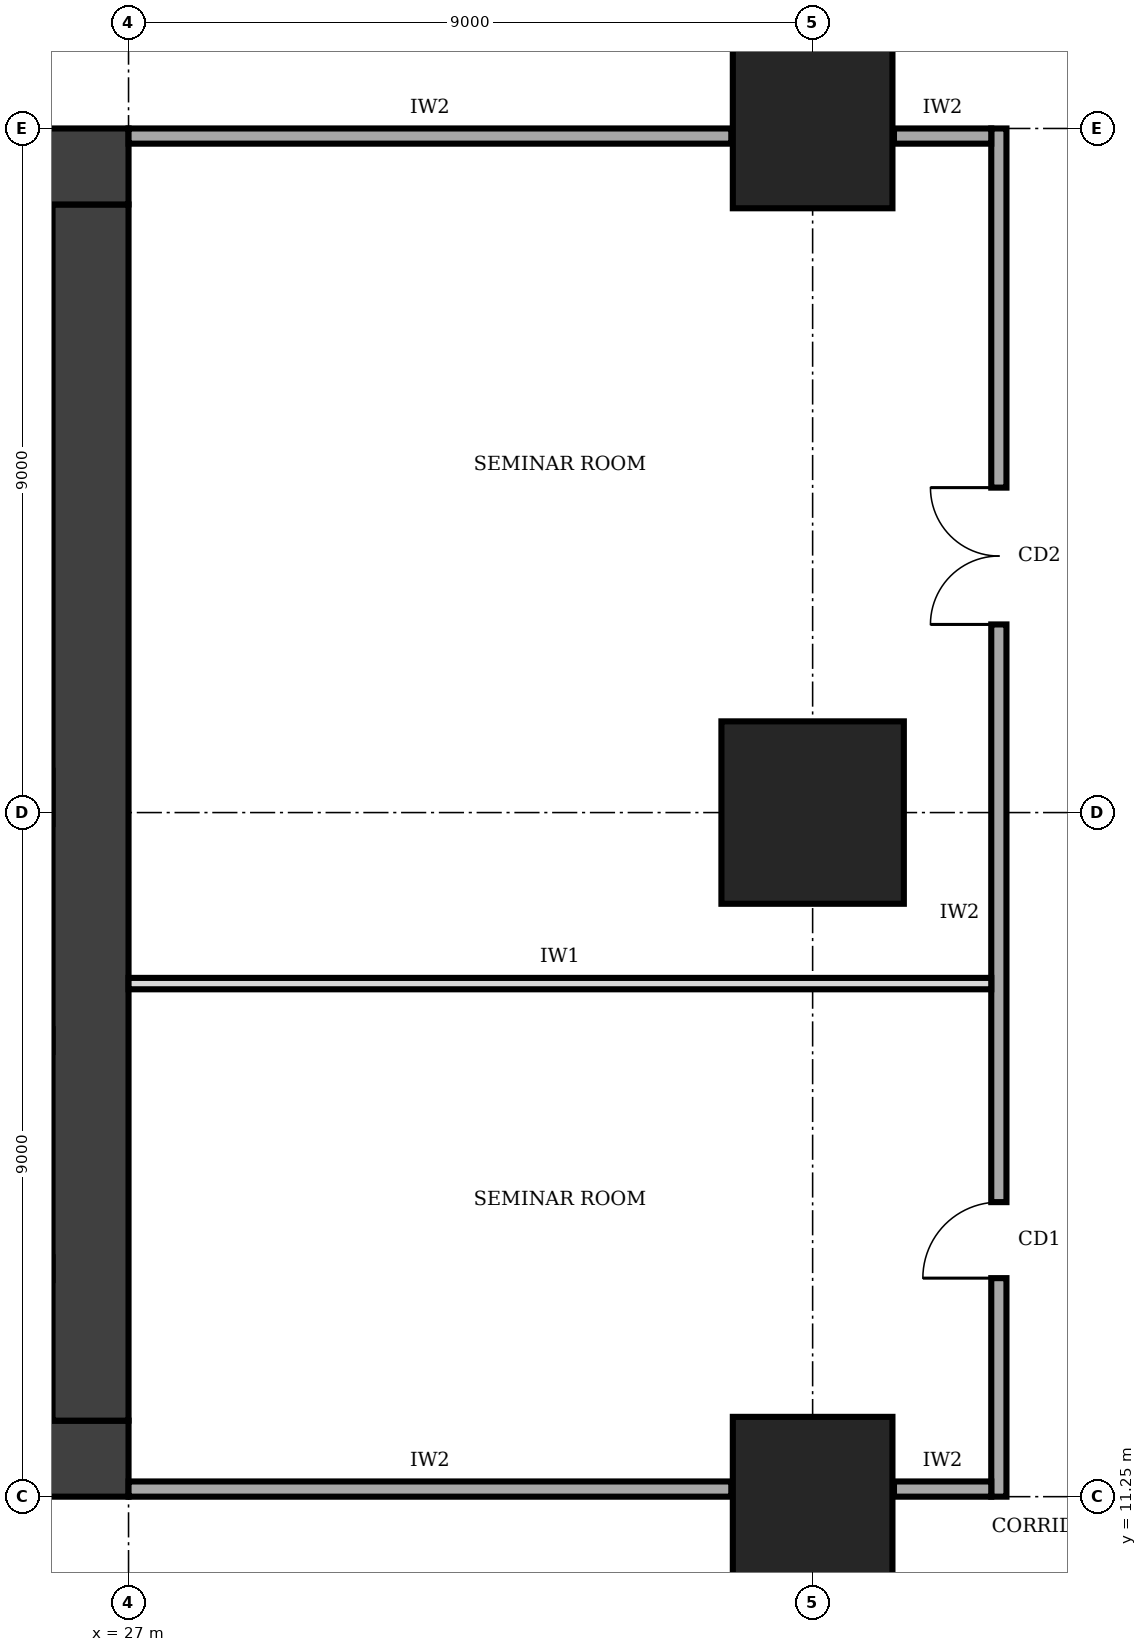
"""IFC4 building model, lengths in metres.
Left out: names, types, materials, properties, quantities, classifications, styles, units other than length and angle.
Written with IfcOpenShell. Run it as: python <this file> out.ifc"""

import sys

from ifc_helpers import new_model, si_unit, direction, frame, frame_2d, origin, origin_2d, place, context, subcontext, project, spatial, rectangle, extrude, element, fill, save


model = new_model("IFC4")
c1 = context("Model", 3, precision=1e-05, world=origin(), true_north=direction((0.0, 1.0)))
c2 = subcontext(c1, "Body", "Model", "MODEL_VIEW")
j1 = project(units=[si_unit("LENGTHUNIT", "METRE"), si_unit("PLANEANGLEUNIT", "RADIAN")], contexts=[c1])
p1 = place(None, origin())
s1 = spatial("IfcSite", under=j1, at=p1, CompositionType="ELEMENT")
p2 = place(p1, origin())
s2 = spatial("IfcBuilding", under=s1, at=p2, CompositionType="ELEMENT")
p3 = place(p2, frame((0.0, 0.0, 161.0)))
s3 = spatial("IfcBuildingStorey", under=s2, at=p3, CompositionType="ELEMENT", Elevation=161.0)
p4 = place(p3, frame((13.5, 11.75, 0.0), z_axis=(0.0, 0.0, 1.0), x_axis=(1.0, 0.0, 0.0)))
e1 = element("IfcWall", 1, at=p4, inside=s3, PredefinedType="SHEAR", context=c2, shape_type="SweptSolid", body=[
    extrude(rectangle(XDim=13.5, YDim=1.0, at=frame_2d((6.75, 0.0))), origin(), (0.0, 0.0, 1.0), 4.0),
])
p5 = place(p4, frame((4.75, 0.0, 0.0)))
e2 = element("IfcOpeningElement", 2, at=p5, cuts=e1, PredefinedType="OPENING", context=c2, shape_type="SweptSolid", body=[
    extrude(rectangle(XDim=1.0, YDim=2.1, at=frame_2d((0.5, 1.05))), frame((0.0, 0.51, 0.0), z_axis=(0.0, -1.0, 0.0), x_axis=(1.0, 0.0, 0.0)), (0.0, 0.0, 1.0), 1.02),
])
p6 = place(p3, frame((26.5, 12.25, 0.0), z_axis=(0.0, 0.0, 1.0), x_axis=(0.0, 1.0, 0.0)))
e3 = element("IfcWall", 3, at=p6, inside=s3, PredefinedType="SHEAR", context=c2, shape_type="SweptSolid", body=[
    extrude(rectangle(XDim=16.0, YDim=1.0, at=frame_2d((8.0, 0.0))), origin(), (0.0, 0.0, 1.0), 4.0),
])
p7 = place(p3, frame((27.0, 28.75, 0.0), z_axis=(0.0, 0.0, 1.0), x_axis=(-1.0, 0.0, 0.0)))
e4 = element("IfcWall", 4, at=p7, inside=s3, PredefinedType="SHEAR", context=c2, shape_type="SweptSolid", body=[
    extrude(rectangle(XDim=13.5, YDim=1.0, at=frame_2d((6.75, 0.0))), origin(), (0.0, 0.0, 1.0), 4.0),
])
p8 = place(p7, frame((4.75, 0.0, 0.0)))
e5 = element("IfcOpeningElement", 5, at=p8, cuts=e4, PredefinedType="OPENING", context=c2, shape_type="SweptSolid", body=[
    extrude(rectangle(XDim=1.8, YDim=2.1, at=frame_2d((0.9, 1.05))), frame((0.0, 0.51, 0.0), z_axis=(0.0, -1.0, 0.0), x_axis=(1.0, 0.0, 0.0)), (0.0, 0.0, 1.0), 1.02),
])
p9 = place(p3, frame((36.0, 11.25, 0.0), z_axis=(0.0, 0.0, 1.0), x_axis=(1.0, 0.0, 0.0)))
e6 = element("IfcColumn", 6, at=p9, inside=s3, PredefinedType="COLUMN", context=c2, shape_type="SweptSolid", body=[
    extrude(rectangle(XDim=2.1, YDim=2.1, at=origin_2d()), origin(), (0.0, 0.0, 1.0), 4.0),
])
p10 = place(p3, frame((36.0, 20.25, 0.0), z_axis=(0.0, 0.0, 1.0), x_axis=(1.0, 0.0, 0.0)))
e7 = element("IfcColumn", 7, at=p10, inside=s3, PredefinedType="COLUMN", context=c2, shape_type="SweptSolid", body=[
    extrude(rectangle(XDim=2.4, YDim=2.4, at=origin_2d()), origin(), (0.0, 0.0, 1.0), 4.0),
])
p11 = place(p3, frame((36.0, 29.25, 0.0), z_axis=(0.0, 0.0, 1.0), x_axis=(1.0, 0.0, 0.0)))
e8 = element("IfcColumn", 8, at=p11, inside=s3, PredefinedType="COLUMN", context=c2, shape_type="SweptSolid", body=[
    extrude(rectangle(XDim=2.1, YDim=2.1, at=origin_2d()), origin(), (0.0, 0.0, 1.0), 4.0),
])
p12 = place(p3, frame((38.45, 11.25, 0.0), z_axis=(0.0, 0.0, 1.0), x_axis=(0.0, 1.0, 0.0)))
e9 = element("IfcWall", 9, at=p12, inside=s3, PredefinedType="SOLIDWALL", context=c2, shape_type="SweptSolid", body=[
    extrude(rectangle(XDim=18.0, YDim=0.2, at=frame_2d((9.0, 0.0))), origin(), (0.0, 0.0, 1.0), 3.75),
])
p13 = place(p12, frame((2.875, 0.0, 0.0)))
e10 = element("IfcOpeningElement", 10, at=p13, cuts=e9, PredefinedType="OPENING", context=c2, shape_type="SweptSolid", body=[
    extrude(rectangle(XDim=1.0, YDim=2.1, at=frame_2d((0.5, 1.05))), frame((0.0, 0.11, 0.0), z_axis=(0.0, -1.0, 0.0), x_axis=(1.0, 0.0, 0.0)), (0.0, 0.0, 1.0), 0.22),
])
p14 = place(p12, frame((11.475, 0.0, 0.0)))
e11 = element("IfcOpeningElement", 11, at=p14, cuts=e9, PredefinedType="OPENING", context=c2, shape_type="SweptSolid", body=[
    extrude(rectangle(XDim=1.8, YDim=2.1, at=frame_2d((0.9, 1.05))), frame((0.0, 0.11, 0.0), z_axis=(0.0, -1.0, 0.0), x_axis=(1.0, 0.0, 0.0)), (0.0, 0.0, 1.0), 0.22),
])
p15 = place(p3, frame((27.0, 11.35, 0.0), z_axis=(0.0, 0.0, 1.0), x_axis=(1.0, 0.0, 0.0)))
e12 = element("IfcWall", 12, at=p15, inside=s3, PredefinedType="SOLIDWALL", context=c2, shape_type="SweptSolid", body=[
    extrude(rectangle(XDim=7.93, YDim=0.2, at=frame_2d((3.965, 0.0))), origin(), (0.0, 0.0, 1.0), 2.85),
])
p16 = place(p3, frame((37.07, 11.35, 0.0), z_axis=(0.0, 0.0, 1.0), x_axis=(1.0, 0.0, 0.0)))
e13 = element("IfcWall", 13, at=p16, inside=s3, PredefinedType="SOLIDWALL", context=c2, shape_type="SweptSolid", body=[
    extrude(rectangle(XDim=1.28, YDim=0.2, at=frame_2d((0.64, 0.0))), origin(), (0.0, 0.0, 1.0), 2.85),
])
p17 = place(p3, frame((27.0, 29.15, 0.0), z_axis=(0.0, 0.0, 1.0), x_axis=(1.0, 0.0, 0.0)))
e14 = element("IfcWall", 14, at=p17, inside=s3, PredefinedType="SOLIDWALL", context=c2, shape_type="SweptSolid", body=[
    extrude(rectangle(XDim=7.93, YDim=0.2, at=frame_2d((3.965, 0.0))), origin(), (0.0, 0.0, 1.0), 2.85),
])
p18 = place(p3, frame((37.07, 29.15, 0.0), z_axis=(0.0, 0.0, 1.0), x_axis=(1.0, 0.0, 0.0)))
e15 = element("IfcWall", 15, at=p18, inside=s3, PredefinedType="SOLIDWALL", context=c2, shape_type="SweptSolid", body=[
    extrude(rectangle(XDim=1.28, YDim=0.2, at=frame_2d((0.64, 0.0))), origin(), (0.0, 0.0, 1.0), 2.85),
])
p19 = place(p3, frame((27.0, 18.0, 0.0), z_axis=(0.0, 0.0, 1.0), x_axis=(1.0, 0.0, 0.0)))
e16 = element("IfcWall", 16, at=p19, inside=s3, PredefinedType="PARTITIONING", context=c2, shape_type="SweptSolid", body=[
    extrude(rectangle(XDim=11.35, YDim=0.15, at=frame_2d((5.675, 0.0))), origin(), (0.0, 0.0, 1.0), 3.75),
])
p20 = place(p13, origin())
e17 = element("IfcDoor", 17, at=p20, inside=s3, OperationType="SINGLE_SWING_LEFT", PredefinedType="DOOR", context=c2, shape_type="SweptSolid", body=[
    extrude(rectangle(XDim=1.0, YDim=2.1, at=frame_2d((0.5, 1.05))), frame((0.0, 0.025, 0.0), z_axis=(0.0, -1.0, 0.0), x_axis=(1.0, 0.0, 0.0)), (0.0, 0.0, 1.0), 0.05),
])
fill(e10, e17)
p21 = place(p14, origin())
e18 = element("IfcDoor", 18, at=p21, inside=s3, OperationType="DOUBLE_DOOR_SINGLE_SWING", PredefinedType="DOOR", context=c2, shape_type="SweptSolid", body=[
    extrude(rectangle(XDim=1.8, YDim=2.1, at=frame_2d((0.9, 1.05))), frame((0.0, 0.025, 0.0), z_axis=(0.0, -1.0, 0.0), x_axis=(1.0, 0.0, 0.0)), (0.0, 0.0, 1.0), 0.05),
])
fill(e11, e18)
save(model, sys.argv[1])
